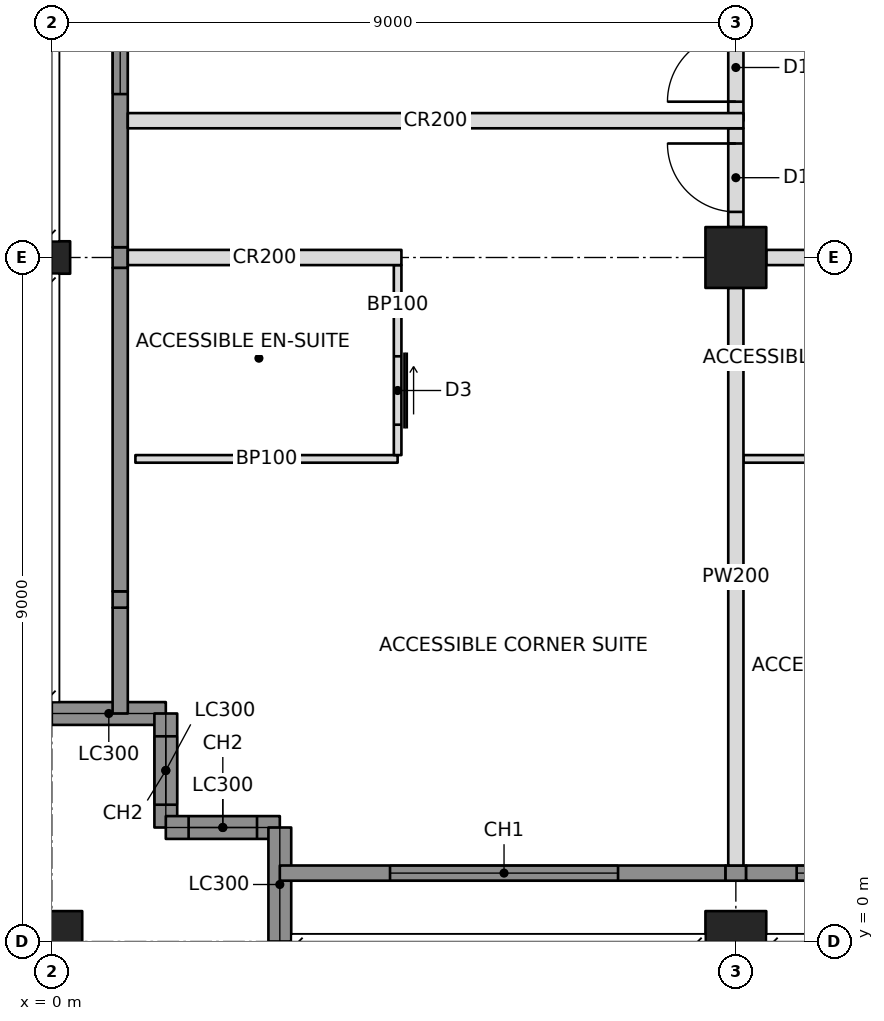
"""IFC4 building model, lengths in metres.
Left out: names, types, materials, properties, quantities, classifications, styles, units other than length and angle.
Written with IfcOpenShell. Run it as: python <this file> out.ifc"""

import sys

from ifc_helpers import new_model, si_unit, direction, frame, frame_2d, origin, origin_with_axes, origin_2d, place, context, subcontext, project, spatial, rectangle, hollow_rectangle, i_section, extrude, element, fill, save


model = new_model("IFC4")
c1 = context("Model", 3, precision=1e-05, world=origin(), true_north=direction((0.0, 1.0)))
c2 = subcontext(c1, "Body", "Model", "MODEL_VIEW")
j1 = project(units=[si_unit("LENGTHUNIT", "METRE"), si_unit("PLANEANGLEUNIT", "RADIAN")], contexts=[c1])
p1 = place(None, origin())
s1 = spatial("IfcSite", under=j1, at=p1, CompositionType="ELEMENT")
p2 = place(p1, origin())
s2 = spatial("IfcBuilding", under=s1, at=p2, CompositionType="ELEMENT")
p3 = place(p2, frame((0.0, 0.0, 194.4)))
s3 = spatial("IfcBuildingStorey", under=s2, at=p3, CompositionType="ELEMENT", Elevation=194.4)
p4 = place(p3, origin_with_axes())
e1 = element("IfcColumn", 1, at=p4, inside=s3, PredefinedType="COLUMN", context=c2, shape_type="SweptSolid", body=[
    extrude(hollow_rectangle(XDim=0.8, YDim=0.8, WallThickness=0.06, at=origin_2d()), origin(), (0.0, 0.0, 1.0), 3.4),
])
p5 = place(p3, frame((0.0, 9.0, 0.0), z_axis=(0.0, 0.0, 1.0), x_axis=(0.0, 1.0, 0.0)))
e2 = element("IfcColumn", 2, at=p5, inside=s3, PredefinedType="COLUMN", context=c2, shape_type="SweptSolid", body=[
    extrude(i_section(OverallWidth=0.427, OverallDepth=0.483, WebThickness=0.051, FlangeThickness=0.082, at=origin_2d()), origin(), (0.0, 0.0, 1.0), 3.4),
])
p6 = place(p3, frame((9.0, 0.0, 0.0), z_axis=(0.0, 0.0, 1.0), x_axis=(1.0, 0.0, 0.0)))
e3 = element("IfcColumn", 3, at=p6, inside=s3, PredefinedType="COLUMN", context=c2, shape_type="SweptSolid", body=[
    extrude(hollow_rectangle(XDim=0.8, YDim=0.8, WallThickness=0.06, at=origin_2d()), origin(), (0.0, 0.0, 1.0), 3.4),
])
p7 = place(p3, frame((9.0, 9.0, 0.0), z_axis=(0.0, 0.0, 1.0), x_axis=(1.0, 0.0, 0.0)))
e4 = element("IfcColumn", 4, at=p7, inside=s3, PredefinedType="COLUMN", context=c2, shape_type="SweptSolid", body=[
    extrude(hollow_rectangle(XDim=0.8, YDim=0.8, WallThickness=0.05, at=origin_2d()), origin(), (0.0, 0.0, 1.0), 3.4),
])
p8 = place(p3, frame((0.0, 3.0, 0.0), z_axis=(0.0, 0.0, 1.0), x_axis=(1.0, 0.0, 0.0)))
e5 = element("IfcWall", 5, at=p8, inside=s3, PredefinedType="SOLIDWALL", context=c2, shape_type="SweptSolid", body=[
    extrude(rectangle(XDim=1.5, YDim=0.3, at=frame_2d((0.75, 0.0))), origin(), (0.0, 0.0, 1.0), 2.42),
])
p9 = place(p3, frame((1.5, 3.0, 0.0), z_axis=(0.0, 0.0, 1.0), x_axis=(0.0, -1.0, 0.0)))
e6 = element("IfcWall", 6, at=p9, inside=s3, PredefinedType="SOLIDWALL", context=c2, shape_type="SweptSolid", body=[
    extrude(rectangle(XDim=1.5, YDim=0.3, at=frame_2d((0.75, 0.0))), origin(), (0.0, 0.0, 1.0), 3.2),
])
p10 = place(p9, frame((0.3, 0.0, 0.6)))
e7 = element("IfcOpeningElement", 7, at=p10, cuts=e6, PredefinedType="OPENING", context=c2, shape_type="SweptSolid", body=[
    extrude(rectangle(XDim=0.9, YDim=2.2, at=frame_2d((0.45, 1.1))), frame((0.0, 0.16, 0.0), z_axis=(0.0, -1.0, 0.0), x_axis=(1.0, 0.0, 0.0)), (0.0, 0.0, 1.0), 0.32),
])
p11 = place(p3, frame((1.5, 1.5, 0.0), z_axis=(0.0, 0.0, 1.0), x_axis=(1.0, 0.0, 0.0)))
e8 = element("IfcWall", 8, at=p11, inside=s3, PredefinedType="SOLIDWALL", context=c2, shape_type="SweptSolid", body=[
    extrude(rectangle(XDim=1.5, YDim=0.3, at=frame_2d((0.75, 0.0))), origin(), (0.0, 0.0, 1.0), 3.2),
])
p12 = place(p11, frame((0.3, 0.0, 0.6)))
e9 = element("IfcOpeningElement", 9, at=p12, cuts=e8, PredefinedType="OPENING", context=c2, shape_type="SweptSolid", body=[
    extrude(rectangle(XDim=0.9, YDim=2.2, at=frame_2d((0.45, 1.1))), frame((0.0, 0.16, 0.0), z_axis=(0.0, -1.0, 0.0), x_axis=(1.0, 0.0, 0.0)), (0.0, 0.0, 1.0), 0.32),
])
p13 = place(p3, frame((3.0, 1.5, 0.0), z_axis=(0.0, 0.0, 1.0), x_axis=(0.0, -1.0, 0.0)))
e10 = element("IfcWall", 10, at=p13, inside=s3, PredefinedType="SOLIDWALL", context=c2, shape_type="SweptSolid", body=[
    extrude(rectangle(XDim=1.5, YDim=0.3, at=frame_2d((0.75, 0.0))), origin(), (0.0, 0.0, 1.0), 2.42),
])
p14 = place(p3, frame((3.0, 0.9, 0.0), z_axis=(0.0, 0.0, 1.0), x_axis=(1.0, 0.0, 0.0)))
e11 = element("IfcWall", 11, at=p14, inside=s3, PredefinedType="SOLIDWALL", context=c2, shape_type="SweptSolid", body=[
    extrude(rectangle(XDim=5.865, YDim=0.2, at=frame_2d((2.932, 0.0))), origin(), (0.0, 0.0, 1.0), 3.2),
])
p15 = place(p14, frame((1.45, 0.0, 0.6)))
e12 = element("IfcOpeningElement", 12, at=p15, cuts=e11, PredefinedType="OPENING", context=c2, shape_type="SweptSolid", body=[
    extrude(rectangle(XDim=3.0, YDim=2.2, at=frame_2d((1.5, 1.1))), frame((0.0, 0.11, 0.0), z_axis=(0.0, -1.0, 0.0), x_axis=(1.0, 0.0, 0.0)), (0.0, 0.0, 1.0), 0.22),
])
p16 = place(p3, frame((0.9, 3.0, 0.0), z_axis=(0.0, 0.0, 1.0), x_axis=(0.0, 1.0, 0.0)))
e13 = element("IfcWall", 13, at=p16, inside=s3, PredefinedType="SOLIDWALL", context=c2, shape_type="SweptSolid", body=[
    extrude(rectangle(XDim=1.393, YDim=0.2, at=frame_2d((0.696, 0.0))), origin(), (0.0, 0.0, 1.0), 3.2),
])
p17 = place(p3, frame((1.0, 9.0, 0.0), z_axis=(0.0, 0.0, 1.0), x_axis=(1.0, 0.0, 0.0)))
e14 = element("IfcWall", 14, at=p17, inside=s3, PredefinedType="PARTITIONING", context=c2, shape_type="SweptSolid", body=[
    extrude(rectangle(XDim=3.6, YDim=0.2, at=frame_2d((1.8, 0.0))), origin(), (0.0, 0.0, 1.0), 2.438),
])
p18 = place(p3, frame((9.4, 9.0, 0.0), z_axis=(0.0, 0.0, 1.0), x_axis=(1.0, 0.0, 0.0)))
e15 = element("IfcWall", 15, at=p18, inside=s3, PredefinedType="PARTITIONING", context=c2, shape_type="SweptSolid", body=[
    extrude(rectangle(XDim=8.2, YDim=0.2, at=frame_2d((4.1, 0.0))), origin(), (0.0, 0.0, 1.0), 2.405),
])
p19 = place(p18, frame((2.95, 0.0, 0.0)))
e16 = element("IfcOpeningElement", 16, at=p19, cuts=e15, PredefinedType="OPENING", context=c2, shape_type="SweptSolid", body=[
    extrude(rectangle(XDim=0.9, YDim=2.1, at=frame_2d((0.45, 1.05))), frame((0.0, 0.11, 0.0), z_axis=(0.0, -1.0, 0.0), x_axis=(1.0, 0.0, 0.0)), (0.0, 0.0, 1.0), 0.22),
])
p20 = place(p18, frame((4.35, 0.0, 0.0)))
e17 = element("IfcOpeningElement", 17, at=p20, cuts=e15, PredefinedType="OPENING", context=c2, shape_type="SweptSolid", body=[
    extrude(rectangle(XDim=0.9, YDim=2.1, at=frame_2d((0.45, 1.05))), frame((0.0, 0.11, 0.0), z_axis=(0.0, -1.0, 0.0), x_axis=(1.0, 0.0, 0.0)), (0.0, 0.0, 1.0), 0.22),
])
p21 = place(p3, frame((9.0, 10.8, 0.0), z_axis=(0.0, 0.0, 1.0), x_axis=(0.0, 1.0, 0.0)))
e18 = element("IfcWall", 18, at=p21, inside=s3, PredefinedType="PARTITIONING", context=c2, shape_type="SweptSolid", body=[
    extrude(rectangle(XDim=6.8, YDim=0.2, at=frame_2d((3.4, 0.0))), origin(), (0.0, 0.0, 1.0), 2.405),
])
p22 = place(p21, frame((0.25, 0.0, 0.0)))
e19 = element("IfcOpeningElement", 19, at=p22, cuts=e18, PredefinedType="OPENING", context=c2, shape_type="SweptSolid", body=[
    extrude(rectangle(XDim=0.9, YDim=2.1, at=frame_2d((0.45, 1.05))), frame((0.0, 0.11, 0.0), z_axis=(0.0, -1.0, 0.0), x_axis=(1.0, 0.0, 0.0)), (0.0, 0.0, 1.0), 0.22),
])
p23 = place(p3, frame((1.0, 10.8, 0.0), z_axis=(0.0, 0.0, 1.0), x_axis=(1.0, 0.0, 0.0)))
e20 = element("IfcWall", 20, at=p23, inside=s3, PredefinedType="PARTITIONING", context=c2, shape_type="SweptSolid", body=[
    extrude(rectangle(XDim=8.1, YDim=0.2, at=frame_2d((4.05, 0.0))), origin(), (0.0, 0.0, 1.0), 2.404),
])
p24 = place(p3, frame((9.0, 8.6, 0.0), z_axis=(0.0, 0.0, 1.0), x_axis=(0.0, -1.0, 0.0)))
e21 = element("IfcWall", 21, at=p24, inside=s3, PredefinedType="PARTITIONING", context=c2, shape_type="SweptSolid", body=[
    extrude(rectangle(XDim=7.6, YDim=0.2, at=frame_2d((3.8, 0.0))), origin(), (0.0, 0.0, 1.0), 2.438),
])
p25 = place(p3, frame((1.1, 6.35, 0.0), z_axis=(0.0, 0.0, 1.0), x_axis=(1.0, 0.0, 0.0)))
e22 = element("IfcWall", 22, at=p25, inside=s3, PredefinedType="PARTITIONING", context=c2, shape_type="SweptSolid", body=[
    extrude(rectangle(XDim=3.45, YDim=0.1, at=frame_2d((1.725, 0.0))), origin(), (0.0, 0.0, 1.0), 3.2),
])
p26 = place(p3, frame((4.55, 8.9, 0.0), z_axis=(0.0, 0.0, 1.0), x_axis=(0.0, -1.0, 0.0)))
e23 = element("IfcWall", 23, at=p26, inside=s3, PredefinedType="PARTITIONING", context=c2, shape_type="SweptSolid", body=[
    extrude(rectangle(XDim=2.5, YDim=0.1, at=frame_2d((1.25, 0.0))), origin(), (0.0, 0.0, 1.0), 2.438),
])
p27 = place(p26, frame((1.2, 0.0, 0.0)))
e24 = element("IfcOpeningElement", 24, at=p27, cuts=e23, PredefinedType="OPENING", context=c2, shape_type="SweptSolid", body=[
    extrude(rectangle(XDim=0.9, YDim=2.1, at=frame_2d((0.45, 1.05))), frame((0.0, 0.06, 0.0), z_axis=(0.0, -1.0, 0.0), x_axis=(1.0, 0.0, 0.0)), (0.0, 0.0, 1.0), 0.12),
])
p28 = place(p3, frame((9.1, 6.35, 0.0), z_axis=(0.0, 0.0, 1.0), x_axis=(1.0, 0.0, 0.0)))
e25 = element("IfcWall", 25, at=p28, inside=s3, PredefinedType="PARTITIONING", context=c2, shape_type="SweptSolid", body=[
    extrude(rectangle(XDim=2.95, YDim=0.1, at=frame_2d((1.475, 0.0))), origin(), (0.0, 0.0, 1.0), 2.438),
])
p29 = place(p3, frame((9.0, 9.4, 0.0), z_axis=(0.0, 0.0, 1.0), x_axis=(0.0, 1.0, 0.0)))
e26 = element("IfcWall", 26, at=p29, inside=s3, PredefinedType="PARTITIONING", context=c2, shape_type="SweptSolid", body=[
    extrude(rectangle(XDim=1.3, YDim=0.2, at=frame_2d((0.65, 0.0))), origin(), (0.0, 0.0, 1.0), 2.405),
])
p30 = place(p29, frame((0.2, 0.0, 0.0)))
e27 = element("IfcOpeningElement", 27, at=p30, cuts=e26, PredefinedType="OPENING", context=c2, shape_type="SweptSolid", body=[
    extrude(rectangle(XDim=0.9, YDim=2.1, at=frame_2d((0.45, 1.05))), frame((0.0, 0.11, 0.0), z_axis=(0.0, -1.0, 0.0), x_axis=(1.0, 0.0, 0.0)), (0.0, 0.0, 1.0), 0.22),
])
p31 = place(p3, frame((8.865, 0.9, 0.0), z_axis=(0.0, 0.0, 1.0), x_axis=(1.0, 0.0, 0.0)))
e28 = element("IfcWall", 28, at=p31, inside=s3, PredefinedType="SOLIDWALL", context=c2, shape_type="SweptSolid", body=[
    extrude(rectangle(XDim=0.271, YDim=0.2, at=frame_2d((0.135, 0.0))), origin(), (0.0, 0.0, 1.0), 2.438),
])
p32 = place(p3, frame((9.135, 0.9, 0.0), z_axis=(0.0, 0.0, 1.0), x_axis=(1.0, 0.0, 0.0)))
e29 = element("IfcWall", 29, at=p32, inside=s3, PredefinedType="SOLIDWALL", context=c2, shape_type="SweptSolid", body=[
    extrude(rectangle(XDim=8.671, YDim=0.2, at=frame_2d((4.335, 0.0))), origin(), (0.0, 0.0, 1.0), 3.2),
])
p33 = place(p32, frame((0.665, 0.0, 0.6)))
e30 = element("IfcOpeningElement", 30, at=p33, cuts=e29, PredefinedType="OPENING", context=c2, shape_type="SweptSolid", body=[
    extrude(rectangle(XDim=3.0, YDim=2.2, at=frame_2d((1.5, 1.1))), frame((0.0, 0.11, 0.0), z_axis=(0.0, -1.0, 0.0), x_axis=(1.0, 0.0, 0.0)), (0.0, 0.0, 1.0), 0.22),
])
p34 = place(p32, frame((5.065, 0.0, 0.6)))
e31 = element("IfcOpeningElement", 31, at=p34, cuts=e29, PredefinedType="OPENING", context=c2, shape_type="SweptSolid", body=[
    extrude(rectangle(XDim=3.0, YDim=2.2, at=frame_2d((1.5, 1.1))), frame((0.0, 0.11, 0.0), z_axis=(0.0, -1.0, 0.0), x_axis=(1.0, 0.0, 0.0)), (0.0, 0.0, 1.0), 0.22),
])
p35 = place(p3, frame((0.9, 4.393, 0.0), z_axis=(0.0, 0.0, 1.0), x_axis=(0.0, 1.0, 0.0)))
e32 = element("IfcWall", 32, at=p35, inside=s3, PredefinedType="SOLIDWALL", context=c2, shape_type="SweptSolid", body=[
    extrude(rectangle(XDim=0.215, YDim=0.2, at=frame_2d((0.107, 0.0))), origin(), (0.0, 0.0, 1.0), 2.661),
])
p36 = place(p3, frame((0.9, 4.607, 0.0), z_axis=(0.0, 0.0, 1.0), x_axis=(0.0, 1.0, 0.0)))
e33 = element("IfcWall", 33, at=p36, inside=s3, PredefinedType="SOLIDWALL", context=c2, shape_type="SweptSolid", body=[
    extrude(rectangle(XDim=4.257, YDim=0.2, at=frame_2d((2.129, 0.0))), origin(), (0.0, 0.0, 1.0), 3.2),
])
p37 = place(p3, frame((0.9, 8.865, 0.0), z_axis=(0.0, 0.0, 1.0), x_axis=(0.0, 1.0, 0.0)))
e34 = element("IfcWall", 34, at=p37, inside=s3, PredefinedType="SOLIDWALL", context=c2, shape_type="SweptSolid", body=[
    extrude(rectangle(XDim=0.271, YDim=0.2, at=frame_2d((0.135, 0.0))), origin(), (0.0, 0.0, 1.0), 2.438),
])
p38 = place(p3, frame((0.9, 9.135, 0.0), z_axis=(0.0, 0.0, 1.0), x_axis=(0.0, 1.0, 0.0)))
e35 = element("IfcWall", 35, at=p38, inside=s3, PredefinedType="SOLIDWALL", context=c2, shape_type="SweptSolid", body=[
    extrude(rectangle(XDim=8.671, YDim=0.2, at=frame_2d((4.335, 0.0))), origin(), (0.0, 0.0, 1.0), 3.2),
])
p39 = place(p38, frame((2.015, 0.0, 0.6)))
e36 = element("IfcOpeningElement", 36, at=p39, cuts=e35, PredefinedType="OPENING", context=c2, shape_type="SweptSolid", body=[
    extrude(rectangle(XDim=3.0, YDim=2.2, at=frame_2d((1.5, 1.1))), frame((0.0, 0.11, 0.0), z_axis=(0.0, -1.0, 0.0), x_axis=(1.0, 0.0, 0.0)), (0.0, 0.0, 1.0), 0.22),
])
p40 = place(p38, frame((5.515, 0.0, 0.6)))
e37 = element("IfcOpeningElement", 37, at=p40, cuts=e35, PredefinedType="OPENING", context=c2, shape_type="SweptSolid", body=[
    extrude(rectangle(XDim=3.0, YDim=2.2, at=frame_2d((1.5, 1.1))), frame((0.0, 0.11, 0.0), z_axis=(0.0, -1.0, 0.0), x_axis=(1.0, 0.0, 0.0)), (0.0, 0.0, 1.0), 0.22),
])
p41 = place(p10, origin())
e38 = element("IfcWindow", 38, at=p41, inside=s3, PartitioningType="SINGLE_PANEL", PredefinedType="WINDOW", context=c2, shape_type="SweptSolid", body=[
    extrude(rectangle(XDim=0.9, YDim=2.2, at=frame_2d((0.45, 1.1))), frame((0.0, 0.03, 0.0), z_axis=(0.0, -1.0, 0.0), x_axis=(1.0, 0.0, 0.0)), (0.0, 0.0, 1.0), 0.06),
])
fill(e7, e38)
p42 = place(p12, origin())
e39 = element("IfcWindow", 39, at=p42, inside=s3, PartitioningType="SINGLE_PANEL", PredefinedType="WINDOW", context=c2, shape_type="SweptSolid", body=[
    extrude(rectangle(XDim=0.9, YDim=2.2, at=frame_2d((0.45, 1.1))), frame((0.0, 0.03, 0.0), z_axis=(0.0, -1.0, 0.0), x_axis=(1.0, 0.0, 0.0)), (0.0, 0.0, 1.0), 0.06),
])
fill(e9, e39)
p43 = place(p15, origin())
e40 = element("IfcWindow", 40, at=p43, inside=s3, PartitioningType="TRIPLE_PANEL_VERTICAL", PredefinedType="WINDOW", context=c2, shape_type="SweptSolid", body=[
    extrude(rectangle(XDim=3.0, YDim=2.2, at=frame_2d((1.5, 1.1))), frame((0.0, 0.03, 0.0), z_axis=(0.0, -1.0, 0.0), x_axis=(1.0, 0.0, 0.0)), (0.0, 0.0, 1.0), 0.06),
])
fill(e12, e40)
p44 = place(p33, origin())
e41 = element("IfcWindow", 41, at=p44, inside=s3, PartitioningType="TRIPLE_PANEL_VERTICAL", PredefinedType="WINDOW", context=c2, shape_type="SweptSolid", body=[
    extrude(rectangle(XDim=3.0, YDim=2.2, at=frame_2d((1.5, 1.1))), frame((0.0, 0.03, 0.0), z_axis=(0.0, -1.0, 0.0), x_axis=(1.0, 0.0, 0.0)), (0.0, 0.0, 1.0), 0.06),
])
fill(e30, e41)
p45 = place(p39, origin())
e42 = element("IfcWindow", 42, at=p45, inside=s3, PartitioningType="TRIPLE_PANEL_VERTICAL", PredefinedType="WINDOW", context=c2, shape_type="SweptSolid", body=[
    extrude(rectangle(XDim=3.0, YDim=2.2, at=frame_2d((1.5, 1.1))), frame((0.0, 0.03, 0.0), z_axis=(0.0, -1.0, 0.0), x_axis=(1.0, 0.0, 0.0)), (0.0, 0.0, 1.0), 0.06),
])
fill(e36, e42)
p46 = place(p27, origin())
e43 = element("IfcDoor", 43, at=p46, inside=s3, OperationType="SLIDING_TO_LEFT", PredefinedType="DOOR", context=c2, shape_type="SweptSolid", body=[
    extrude(rectangle(XDim=0.9, YDim=2.1, at=frame_2d((0.45, 1.05))), frame((0.0, 0.025, 0.0), z_axis=(0.0, -1.0, 0.0), x_axis=(1.0, 0.0, 0.0)), (0.0, 0.0, 1.0), 0.05),
])
fill(e24, e43)
p47 = place(p22, origin())
e44 = element("IfcDoor", 44, at=p47, inside=s3, OperationType="SINGLE_SWING_LEFT", PredefinedType="DOOR", context=c2, shape_type="SweptSolid", body=[
    extrude(rectangle(XDim=0.9, YDim=2.1, at=frame_2d((0.45, 1.05))), frame((0.0, 0.025, 0.0), z_axis=(0.0, -1.0, 0.0), x_axis=(1.0, 0.0, 0.0)), (0.0, 0.0, 1.0), 0.05),
])
fill(e19, e44)
p48 = place(p30, origin())
e45 = element("IfcDoor", 45, at=p48, inside=s3, OperationType="SINGLE_SWING_RIGHT", PredefinedType="DOOR", context=c2, shape_type="SweptSolid", body=[
    extrude(rectangle(XDim=0.9, YDim=2.1, at=frame_2d((0.45, 1.05))), frame((0.0, 0.025, 0.0), z_axis=(0.0, -1.0, 0.0), x_axis=(1.0, 0.0, 0.0)), (0.0, 0.0, 1.0), 0.05),
])
fill(e27, e45)
save(model, sys.argv[1])
